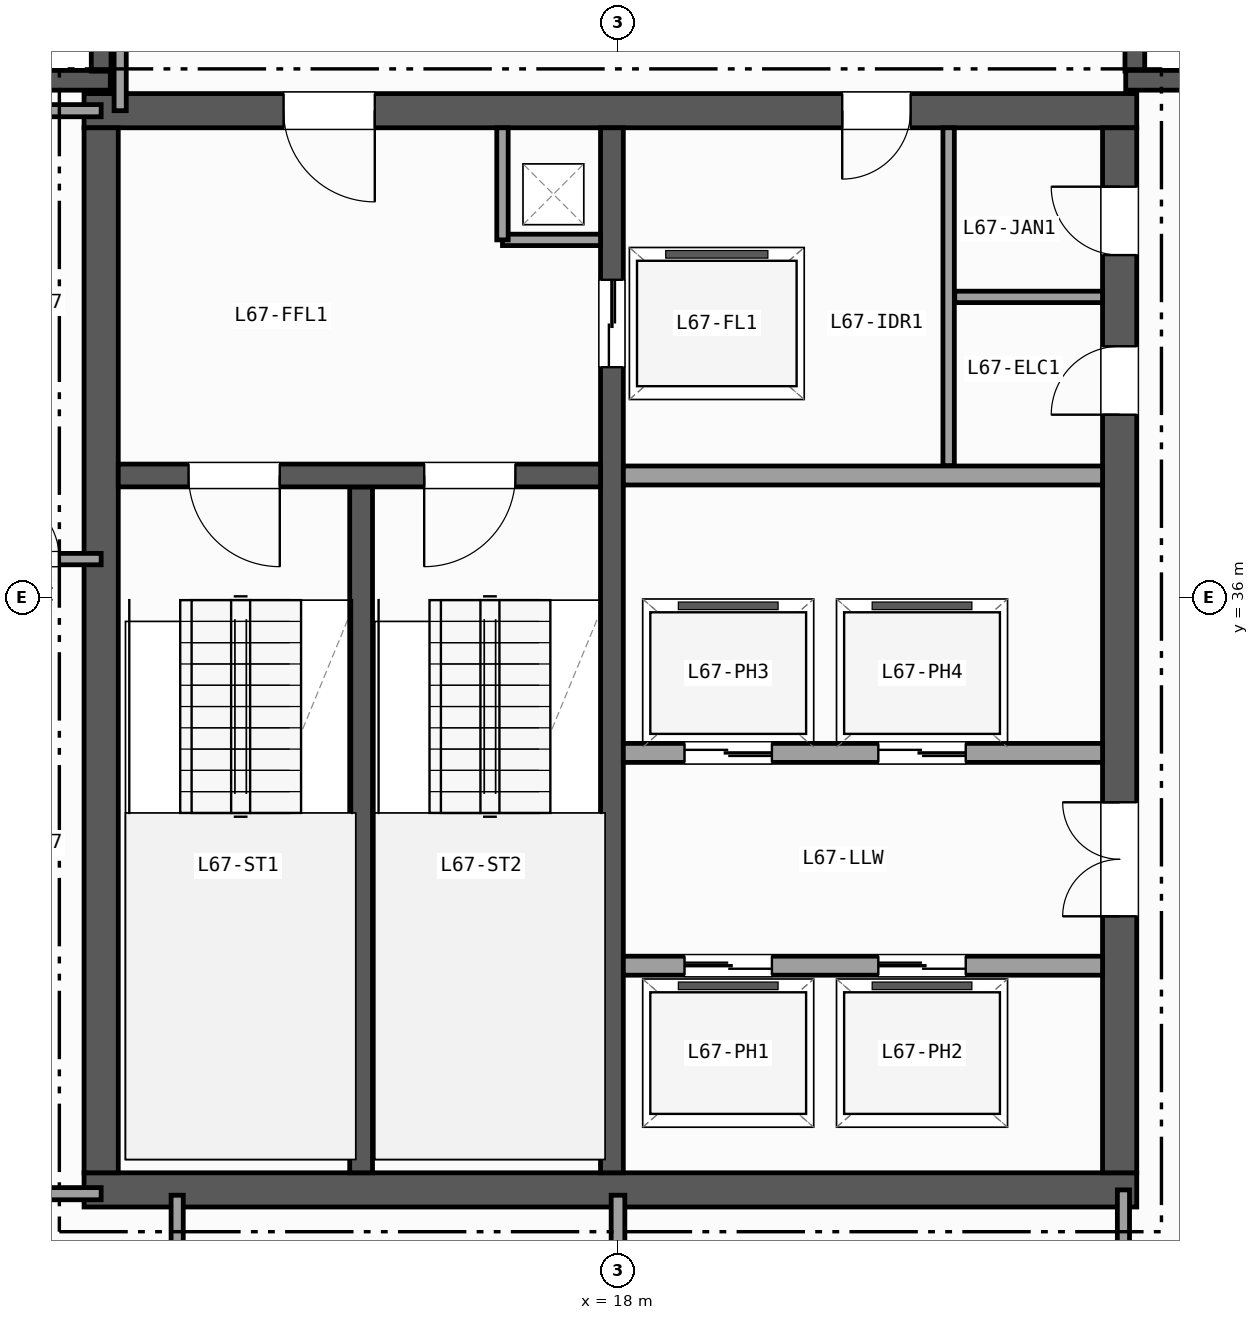
"""IFC4 building model, lengths in metres.
Left out: names, types, materials, properties, quantities, classifications, styles, units other than length and angle.
Written with IfcOpenShell. Run it as: python <this file> out.ifc"""

import sys

from ifc_helpers import new_model, si_unit, direction, frame, frame_2d, origin, place, context, subcontext, project, spatial, rectangle, extrude, element, fill, save


model = new_model("IFC4")
c1 = context("Model", 3, precision=1e-05, world=origin(), true_north=direction((0.0, 1.0)))
c2 = subcontext(c1, "Body", "Model", "MODEL_VIEW")
j1 = project(units=[si_unit("LENGTHUNIT", "METRE"), si_unit("PLANEANGLEUNIT", "RADIAN")], contexts=[c1])
p1 = place(None, origin())
s1 = spatial("IfcSite", under=j1, at=p1, CompositionType="ELEMENT")
p2 = place(p1, origin())
s2 = spatial("IfcBuilding", under=s1, at=p2, CompositionType="ELEMENT")
p3 = place(p2, frame((0.0, 0.0, 266.7)))
s3 = spatial("IfcBuildingStorey", under=s2, at=p3, CompositionType="ELEMENT", Elevation=266.7)
p4 = place(p3, frame((9.0, 42.8, 0.0), z_axis=(0.0, 0.0, 1.0), x_axis=(1.0, 0.0, 0.0)))
e1 = element("IfcWall", 1, at=p4, inside=s3, PredefinedType="SOLIDWALL", context=c2, shape_type="SweptSolid", body=[
    extrude(rectangle(XDim=2.32, YDim=0.26, at=frame_2d((1.16, 0.0))), origin(), (0.0, 0.0, 1.0), 3.42),
])
for number, where, z_axis, x_axis in (
    (2, (11.2, 42.92, 0.0), (0.0, 0.0, 1.0), (0.0, 1.0, 0.0)),
    (3, (24.8, 45.0, 0.0), (0.0, 0.0, 1.0), (0.0, -1.0, 0.0)),
):
    element("IfcWall", number, at=place(p3, frame(where, z_axis=z_axis, x_axis=x_axis)), inside=s3, PredefinedType="SOLIDWALL", context=c2, shape_type="SweptSolid", body=[
        extrude(rectangle(XDim=2.08, YDim=0.26, at=frame_2d((1.04, 0.0))), origin(), (0.0, 0.0, 1.0), 3.42),
    ])
p5 = place(p3, frame((24.68, 42.8, 0.0), z_axis=(0.0, 0.0, 1.0), x_axis=(1.0, 0.0, 0.0)))
e4 = element("IfcWall", 4, at=p5, inside=s3, PredefinedType="SOLIDWALL", context=c2, shape_type="SweptSolid", body=[
    extrude(rectangle(XDim=2.32, YDim=0.26, at=frame_2d((1.16, 0.0))), origin(), (0.0, 0.0, 1.0), 3.42),
])
p6 = place(p3, frame((10.975, 28.2, 0.0), z_axis=(0.0, 0.0, 1.0), x_axis=(1.0, 0.0, 0.0)))
e5 = element("IfcWall", 5, at=p6, inside=s3, PredefinedType="SHEAR", context=c2, shape_type="SweptSolid", body=[
    extrude(rectangle(XDim=13.85, YDim=0.45, at=frame_2d((6.925, 0.0))), origin(), (0.0, 0.0, 1.0), 3.42),
])
p7 = place(p3, frame((24.825, 42.4, 0.0), z_axis=(0.0, 0.0, 1.0), x_axis=(-1.0, 0.0, 0.0)))
e6 = element("IfcWall", 6, at=p7, inside=s3, PredefinedType="SHEAR", context=c2, shape_type="SweptSolid", body=[
    extrude(rectangle(XDim=13.85, YDim=0.45, at=frame_2d((6.925, 0.0))), origin(), (0.0, 0.0, 1.0), 3.42),
])
p8 = place(p7, frame((10.025, 0.0, 0.0)))
e7 = element("IfcOpeningElement", 7, at=p8, cuts=e6, PredefinedType="OPENING", context=c2, shape_type="SweptSolid", body=[
    extrude(rectangle(XDim=1.2, YDim=2.15, at=frame_2d((0.6, 1.075))), frame((0.0, 0.235, 0.0), z_axis=(0.0, -1.0, 0.0), x_axis=(1.0, 0.0, 0.0)), (0.0, 0.0, 1.0), 0.47),
])
p9 = place(p7, frame((2.975, 0.0, 0.0)))
e8 = element("IfcOpeningElement", 8, at=p9, cuts=e6, PredefinedType="OPENING", context=c2, shape_type="SweptSolid", body=[
    extrude(rectangle(XDim=0.9, YDim=2.1, at=frame_2d((0.45, 1.05))), frame((0.0, 0.235, 0.0), z_axis=(0.0, -1.0, 0.0), x_axis=(1.0, 0.0, 0.0)), (0.0, 0.0, 1.0), 0.47),
])
p10 = place(p3, frame((11.2, 42.175, 0.0), z_axis=(0.0, 0.0, 1.0), x_axis=(0.0, -1.0, 0.0)))
e9 = element("IfcWall", 9, at=p10, inside=s3, PredefinedType="SHEAR", context=c2, shape_type="SweptSolid", body=[
    extrude(rectangle(XDim=13.75, YDim=0.45, at=frame_2d((6.875, 0.0))), origin(), (0.0, 0.0, 1.0), 3.42),
])
p11 = place(p3, frame((24.6, 28.425, 0.0), z_axis=(0.0, 0.0, 1.0), x_axis=(0.0, 1.0, 0.0)))
e10 = element("IfcWall", 10, at=p11, inside=s3, PredefinedType="SHEAR", context=c2, shape_type="SweptSolid", body=[
    extrude(rectangle(XDim=13.75, YDim=0.45, at=frame_2d((6.875, 0.0))), origin(), (0.0, 0.0, 1.0), 3.42),
])
p12 = place(p11, frame((3.375, 0.0, 0.0)))
e11 = element("IfcOpeningElement", 11, at=p12, cuts=e10, PredefinedType="OPENING", context=c2, shape_type="SweptSolid", body=[
    extrude(rectangle(XDim=1.5, YDim=2.2, at=frame_2d((0.75, 1.1))), frame((0.0, 0.235, 0.0), z_axis=(0.0, -1.0, 0.0), x_axis=(1.0, 0.0, 0.0)), (0.0, 0.0, 1.0), 0.47),
])
p13 = place(p11, frame((9.975, 0.0, 0.0)))
e12 = element("IfcOpeningElement", 12, at=p13, cuts=e10, PredefinedType="OPENING", context=c2, shape_type="SweptSolid", body=[
    extrude(rectangle(XDim=0.9, YDim=2.1, at=frame_2d((0.45, 1.05))), frame((0.0, 0.235, 0.0), z_axis=(0.0, -1.0, 0.0), x_axis=(1.0, 0.0, 0.0)), (0.0, 0.0, 1.0), 0.47),
])
p14 = place(p11, frame((12.075, 0.0, 0.0)))
e13 = element("IfcOpeningElement", 13, at=p14, cuts=e10, PredefinedType="OPENING", context=c2, shape_type="SweptSolid", body=[
    extrude(rectangle(XDim=0.9, YDim=2.1, at=frame_2d((0.45, 1.05))), frame((0.0, 0.235, 0.0), z_axis=(0.0, -1.0, 0.0), x_axis=(1.0, 0.0, 0.0)), (0.0, 0.0, 1.0), 0.47),
])
p15 = place(p3, frame((14.62, 28.425, 0.0), z_axis=(0.0, 0.0, 1.0), x_axis=(0.0, 1.0, 0.0)))
e14 = element("IfcWall", 14, at=p15, inside=s3, PredefinedType="SHEAR", context=c2, shape_type="SweptSolid", body=[
    extrude(rectangle(XDim=9.025, YDim=0.3, at=frame_2d((4.512, 0.0))), origin(), (0.0, 0.0, 1.0), 3.42),
])
p16 = place(p3, frame((17.92, 42.175, 0.0), z_axis=(0.0, 0.0, 1.0), x_axis=(0.0, -1.0, 0.0)))
e15 = element("IfcWall", 15, at=p16, inside=s3, PredefinedType="SHEAR", context=c2, shape_type="SweptSolid", body=[
    extrude(rectangle(XDim=13.75, YDim=0.3, at=frame_2d((6.875, 0.0))), origin(), (0.0, 0.0, 1.0), 3.42),
])
p17 = place(p16, frame((2.0, 0.0, 0.0)))
e16 = element("IfcOpeningElement", 16, at=p17, cuts=e15, PredefinedType="OPENING", context=c2, shape_type="SweptSolid", body=[
    extrude(rectangle(XDim=1.15, YDim=2.15, at=frame_2d((0.575, 1.075))), frame((0.0, 0.16, 0.0), z_axis=(0.0, -1.0, 0.0), x_axis=(1.0, 0.0, 0.0)), (0.0, 0.0, 1.0), 0.32),
])
p18 = place(p3, frame((17.77, 37.6, 0.0), z_axis=(0.0, 0.0, 1.0), x_axis=(-1.0, 0.0, 0.0)))
e17 = element("IfcWall", 17, at=p18, inside=s3, PredefinedType="SHEAR", context=c2, shape_type="SweptSolid", body=[
    extrude(rectangle(XDim=6.345, YDim=0.3, at=frame_2d((3.172, 0.0))), origin(), (0.0, 0.0, 1.0), 3.42),
])
p19 = place(p18, frame((4.22, 0.0, 0.0)))
e18 = element("IfcOpeningElement", 18, at=p19, cuts=e17, PredefinedType="OPENING", context=c2, shape_type="SweptSolid", body=[
    extrude(rectangle(XDim=1.2, YDim=2.15, at=frame_2d((0.6, 1.075))), frame((0.0, 0.16, 0.0), z_axis=(0.0, -1.0, 0.0), x_axis=(1.0, 0.0, 0.0)), (0.0, 0.0, 1.0), 0.32),
])
p20 = place(p18, frame((1.12, 0.0, 0.0)))
e19 = element("IfcOpeningElement", 19, at=p20, cuts=e17, PredefinedType="OPENING", context=c2, shape_type="SweptSolid", body=[
    extrude(rectangle(XDim=1.2, YDim=2.15, at=frame_2d((0.6, 1.075))), frame((0.0, 0.16, 0.0), z_axis=(0.0, -1.0, 0.0), x_axis=(1.0, 0.0, 0.0)), (0.0, 0.0, 1.0), 0.32),
])
p21 = place(p3, frame((16.48, 40.7, 0.0), z_axis=(0.0, 0.0, 1.0), x_axis=(1.0, 0.0, 0.0)))
e20 = element("IfcWall", 20, at=p21, inside=s3, PredefinedType="PARTITIONING", context=c2, shape_type="SweptSolid", body=[
    extrude(rectangle(XDim=1.29, YDim=0.15, at=frame_2d((0.645, 0.0))), origin(), (0.0, 0.0, 1.0), 3.42),
])
p22 = place(p3, frame((16.48, 40.7, 0.0), z_axis=(0.0, 0.0, 1.0), x_axis=(0.0, 1.0, 0.0)))
e21 = element("IfcWall", 21, at=p22, inside=s3, PredefinedType="PARTITIONING", context=c2, shape_type="SweptSolid", body=[
    extrude(rectangle(XDim=1.475, YDim=0.15, at=frame_2d((0.738, 0.0))), origin(), (0.0, 0.0, 1.0), 3.42),
])
p23 = place(p3, frame((18.07, 37.6, 0.0), z_axis=(0.0, 0.0, 1.0), x_axis=(1.0, 0.0, 0.0)))
e22 = element("IfcWall", 22, at=p23, inside=s3, PredefinedType="PARTITIONING", context=c2, shape_type="SweptSolid", body=[
    extrude(rectangle(XDim=6.305, YDim=0.25, at=frame_2d((3.152, 0.0))), origin(), (0.0, 0.0, 1.0), 3.42),
])
p24 = place(p3, frame((18.07, 31.15, 0.0), z_axis=(0.0, 0.0, 1.0), x_axis=(1.0, 0.0, 0.0)))
e23 = element("IfcWall", 23, at=p24, inside=s3, PredefinedType="PARTITIONING", context=c2, shape_type="SweptSolid", body=[
    extrude(rectangle(XDim=6.305, YDim=0.25, at=frame_2d((3.152, 0.0))), origin(), (0.0, 0.0, 1.0), 3.42),
])
p25 = place(p24, frame((0.805, 0.0, 0.0)))
e24 = element("IfcOpeningElement", 24, at=p25, cuts=e23, PredefinedType="OPENING", context=c2, shape_type="SweptSolid", body=[
    extrude(rectangle(XDim=1.15, YDim=2.15, at=frame_2d((0.575, 1.075))), frame((0.0, 0.135, 0.0), z_axis=(0.0, -1.0, 0.0), x_axis=(1.0, 0.0, 0.0)), (0.0, 0.0, 1.0), 0.27),
])
p26 = place(p24, frame((3.355, 0.0, 0.0)))
e25 = element("IfcOpeningElement", 25, at=p26, cuts=e23, PredefinedType="OPENING", context=c2, shape_type="SweptSolid", body=[
    extrude(rectangle(XDim=1.15, YDim=2.15, at=frame_2d((0.575, 1.075))), frame((0.0, 0.135, 0.0), z_axis=(0.0, -1.0, 0.0), x_axis=(1.0, 0.0, 0.0)), (0.0, 0.0, 1.0), 0.27),
])
p27 = place(p3, frame((24.375, 33.95, 0.0), z_axis=(0.0, 0.0, 1.0), x_axis=(-1.0, 0.0, 0.0)))
e26 = element("IfcWall", 26, at=p27, inside=s3, PredefinedType="PARTITIONING", context=c2, shape_type="SweptSolid", body=[
    extrude(rectangle(XDim=6.305, YDim=0.25, at=frame_2d((3.152, 0.0))), origin(), (0.0, 0.0, 1.0), 3.42),
])
p28 = place(p27, frame((4.35, 0.0, 0.0)))
e27 = element("IfcOpeningElement", 27, at=p28, cuts=e26, PredefinedType="OPENING", context=c2, shape_type="SweptSolid", body=[
    extrude(rectangle(XDim=1.15, YDim=2.15, at=frame_2d((0.575, 1.075))), frame((0.0, 0.135, 0.0), z_axis=(0.0, -1.0, 0.0), x_axis=(1.0, 0.0, 0.0)), (0.0, 0.0, 1.0), 0.27),
])
p29 = place(p27, frame((1.8, 0.0, 0.0)))
e28 = element("IfcOpeningElement", 28, at=p29, cuts=e26, PredefinedType="OPENING", context=c2, shape_type="SweptSolid", body=[
    extrude(rectangle(XDim=1.15, YDim=2.15, at=frame_2d((0.575, 1.075))), frame((0.0, 0.135, 0.0), z_axis=(0.0, -1.0, 0.0), x_axis=(1.0, 0.0, 0.0)), (0.0, 0.0, 1.0), 0.27),
])
p30 = place(p3, frame((22.35, 37.73, 0.0), z_axis=(0.0, 0.0, 1.0), x_axis=(0.0, 1.0, 0.0)))
e29 = element("IfcWall", 29, at=p30, inside=s3, PredefinedType="PARTITIONING", context=c2, shape_type="SweptSolid", body=[
    extrude(rectangle(XDim=4.445, YDim=0.15, at=frame_2d((2.223, 0.0))), origin(), (0.0, 0.0, 1.0), 3.42),
])
p31 = place(p3, frame((22.43, 39.95, 0.0), z_axis=(0.0, 0.0, 1.0), x_axis=(1.0, 0.0, 0.0)))
e30 = element("IfcWall", 30, at=p31, inside=s3, PredefinedType="PARTITIONING", context=c2, shape_type="SweptSolid", body=[
    extrude(rectangle(XDim=1.945, YDim=0.15, at=frame_2d((0.973, 0.0))), origin(), (0.0, 0.0, 1.0), 3.42),
])
p32 = place(p3, frame((9.0, 28.15, 0.0), z_axis=(0.0, 0.0, 1.0), x_axis=(1.0, 0.0, 0.0)))
e31 = element("IfcWall", 31, at=p32, inside=s3, PredefinedType="PARTITIONING", context=c2, shape_type="SweptSolid", body=[
    extrude(rectangle(XDim=2.2, YDim=0.16, at=frame_2d((1.1, 0.0))), origin(), (0.0, 0.0, 1.0), 2.707),
])
p33 = place(p32, frame((0.45, 0.0, 0.0)))
e32 = element("IfcOpeningElement", 32, at=p33, cuts=e31, PredefinedType="OPENING", context=c2, shape_type="SweptSolid", body=[
    extrude(rectangle(XDim=0.95, YDim=2.1, at=frame_2d((0.475, 1.05))), frame((0.0, 0.09, 0.0), z_axis=(0.0, -1.0, 0.0), x_axis=(1.0, 0.0, 0.0)), (0.0, 0.0, 1.0), 0.18),
])
p34 = place(p3, frame((8.761, 42.4, 0.0), z_axis=(0.0, 0.0, 1.0), x_axis=(1.0, 0.0, 0.0)))
e33 = element("IfcWall", 33, at=p34, inside=s3, PredefinedType="PARTITIONING", context=c2, shape_type="SweptSolid", body=[
    extrude(rectangle(XDim=2.439, YDim=0.16, at=frame_2d((1.219, 0.0))), origin(), (0.0, 0.0, 1.0), 3.42),
])
p35 = place(p3, frame((11.45, 42.4, 0.0), z_axis=(0.0, 0.0, 1.0), x_axis=(0.0, 1.0, 0.0)))
e34 = element("IfcWall", 34, at=p35, inside=s3, PredefinedType="PARTITIONING", context=c2, shape_type="SweptSolid", body=[
    extrude(rectangle(XDim=2.666, YDim=0.16, at=frame_2d((1.333, 0.0))), origin(), (0.0, 0.0, 1.0), 3.42),
])
p36 = place(p3, frame((9.0, 36.5, 0.0), z_axis=(0.0, 0.0, 1.0), x_axis=(1.0, 0.0, 0.0)))
e35 = element("IfcWall", 35, at=p36, inside=s3, PredefinedType="PARTITIONING", context=c2, shape_type="SweptSolid", body=[
    extrude(rectangle(XDim=2.2, YDim=0.15, at=frame_2d((1.1, 0.0))), origin(), (0.0, 0.0, 1.0), 3.42),
])
p37 = place(p36, frame((0.75, 0.0, 0.0)))
e36 = element("IfcOpeningElement", 36, at=p37, cuts=e35, PredefinedType="OPENING", context=c2, shape_type="SweptSolid", body=[
    extrude(rectangle(XDim=0.9, YDim=2.1, at=frame_2d((0.45, 1.05))), frame((0.0, 0.085, 0.0), z_axis=(0.0, -1.0, 0.0), x_axis=(1.0, 0.0, 0.0)), (0.0, 0.0, 1.0), 0.17),
])
p38 = place(p3, frame((24.65, 9.0, 0.0), z_axis=(0.0, 0.0, 1.0), x_axis=(0.0, 1.0, 0.0)))
e37 = element("IfcWall", 37, at=p38, inside=s3, PredefinedType="PARTITIONING", context=c2, shape_type="SweptSolid", body=[
    extrude(rectangle(XDim=19.2, YDim=0.16, at=frame_2d((9.6, 0.0))), origin(), (0.0, 0.0, 1.0), 2.707),
])
p39 = place(p38, frame((8.6, 0.0, 0.0)))
e38 = element("IfcOpeningElement", 38, at=p39, cuts=e37, PredefinedType="OPENING", context=c2, shape_type="SweptSolid", body=[
    extrude(rectangle(XDim=1.05, YDim=2.15, at=frame_2d((0.525, 1.075))), frame((0.0, 0.09, 0.0), z_axis=(0.0, -1.0, 0.0), x_axis=(1.0, 0.0, 0.0)), (0.0, 0.0, 1.0), 0.18),
])
p40 = place(p38, frame((2.55, 0.0, 0.0)))
e39 = element("IfcOpeningElement", 39, at=p40, cuts=e37, PredefinedType="OPENING", context=c2, shape_type="SweptSolid", body=[
    extrude(rectangle(XDim=1.2, YDim=2.15, at=frame_2d((0.6, 1.075))), frame((0.0, 0.09, 0.0), z_axis=(0.0, -1.0, 0.0), x_axis=(1.0, 0.0, 0.0)), (0.0, 0.0, 1.0), 0.18),
])
p41 = place(p3, frame((18.0, 15.8, 0.0), z_axis=(0.0, 0.0, 1.0), x_axis=(0.0, 1.0, 0.0)))
e40 = element("IfcWall", 40, at=p41, inside=s3, PredefinedType="PARTITIONING", context=c2, shape_type="SweptSolid", body=[
    extrude(rectangle(XDim=12.33, YDim=0.18, at=frame_2d((6.165, 0.0))), origin(), (0.0, 0.0, 1.0), 2.789),
])
p42 = place(p41, frame((5.7, 0.0, 0.0)))
e41 = element("IfcOpeningElement", 41, at=p42, cuts=e40, PredefinedType="OPENING", context=c2, shape_type="SweptSolid", body=[
    extrude(rectangle(XDim=0.86, YDim=2.05, at=frame_2d((0.43, 1.025))), frame((0.0, 0.1, 0.0), z_axis=(0.0, -1.0, 0.0), x_axis=(1.0, 0.0, 0.0)), (0.0, 0.0, 1.0), 0.2),
])
p43 = place(p3, frame((12.2, 18.0, 0.0), z_axis=(0.0, 0.0, 1.0), x_axis=(0.0, 1.0, 0.0)))
e42 = element("IfcWall", 42, at=p43, inside=s3, PredefinedType="PARTITIONING", context=c2, shape_type="SweptSolid", body=[
    extrude(rectangle(XDim=10.13, YDim=0.16, at=frame_2d((5.065, 0.0))), origin(), (0.0, 0.0, 1.0), 2.789),
])
p44 = place(p43, frame((2.5, 0.0, 0.0)))
e43 = element("IfcOpeningElement", 43, at=p44, cuts=e42, PredefinedType="OPENING", context=c2, shape_type="SweptSolid", body=[
    extrude(rectangle(XDim=0.95, YDim=2.1, at=frame_2d((0.475, 1.05))), frame((0.0, 0.09, 0.0), z_axis=(0.0, -1.0, 0.0), x_axis=(1.0, 0.0, 0.0)), (0.0, 0.0, 1.0), 0.18),
])
p45 = place(p19, origin())
e44 = element("IfcDoor", 44, at=p45, inside=s3, OperationType="SINGLE_SWING_LEFT", PredefinedType="DOOR", context=c2, shape_type="SweptSolid", body=[
    extrude(rectangle(XDim=1.2, YDim=2.15, at=frame_2d((0.6, 1.075))), frame((0.0, 0.025, 0.0), z_axis=(0.0, -1.0, 0.0), x_axis=(1.0, 0.0, 0.0)), (0.0, 0.0, 1.0), 0.05),
])
fill(e18, e44)
p46 = place(p20, origin())
e45 = element("IfcDoor", 45, at=p46, inside=s3, OperationType="SINGLE_SWING_RIGHT", PredefinedType="DOOR", context=c2, shape_type="SweptSolid", body=[
    extrude(rectangle(XDim=1.2, YDim=2.15, at=frame_2d((0.6, 1.075))), frame((0.0, 0.025, 0.0), z_axis=(0.0, -1.0, 0.0), x_axis=(1.0, 0.0, 0.0)), (0.0, 0.0, 1.0), 0.05),
])
fill(e19, e45)
p47 = place(p12, origin())
e46 = element("IfcDoor", 46, at=p47, inside=s3, OperationType="DOUBLE_DOOR_SINGLE_SWING", PredefinedType="DOOR", context=c2, shape_type="SweptSolid", body=[
    extrude(rectangle(XDim=1.5, YDim=2.2, at=frame_2d((0.75, 1.1))), frame((0.0, 0.025, 0.0), z_axis=(0.0, -1.0, 0.0), x_axis=(1.0, 0.0, 0.0)), (0.0, 0.0, 1.0), 0.05),
])
fill(e11, e46)
p48 = place(p8, origin())
e47 = element("IfcDoor", 47, at=p48, inside=s3, OperationType="SINGLE_SWING_LEFT", PredefinedType="DOOR", context=c2, shape_type="SweptSolid", body=[
    extrude(rectangle(XDim=1.2, YDim=2.15, at=frame_2d((0.6, 1.075))), frame((0.0, 0.025, 0.0), z_axis=(0.0, -1.0, 0.0), x_axis=(1.0, 0.0, 0.0)), (0.0, 0.0, 1.0), 0.05),
])
fill(e7, e47)
p49 = place(p13, origin())
e48 = element("IfcDoor", 48, at=p49, inside=s3, OperationType="SINGLE_SWING_LEFT", PredefinedType="DOOR", context=c2, shape_type="SweptSolid", body=[
    extrude(rectangle(XDim=0.9, YDim=2.1, at=frame_2d((0.45, 1.05))), frame((0.0, 0.025, 0.0), z_axis=(0.0, -1.0, 0.0), x_axis=(1.0, 0.0, 0.0)), (0.0, 0.0, 1.0), 0.05),
])
fill(e12, e48)
p50 = place(p9, origin())
e49 = element("IfcDoor", 49, at=p50, inside=s3, OperationType="SINGLE_SWING_RIGHT", PredefinedType="DOOR", context=c2, shape_type="SweptSolid", body=[
    extrude(rectangle(XDim=0.9, YDim=2.1, at=frame_2d((0.45, 1.05))), frame((0.0, 0.025, 0.0), z_axis=(0.0, -1.0, 0.0), x_axis=(1.0, 0.0, 0.0)), (0.0, 0.0, 1.0), 0.05),
])
fill(e8, e49)
p51 = place(p14, origin())
e50 = element("IfcDoor", 50, at=p51, inside=s3, OperationType="SINGLE_SWING_RIGHT", PredefinedType="DOOR", context=c2, shape_type="SweptSolid", body=[
    extrude(rectangle(XDim=0.9, YDim=2.1, at=frame_2d((0.45, 1.05))), frame((0.0, 0.025, 0.0), z_axis=(0.0, -1.0, 0.0), x_axis=(1.0, 0.0, 0.0)), (0.0, 0.0, 1.0), 0.05),
])
fill(e13, e50)
p52 = place(p17, origin())
e51 = element("IfcDoor", 51, at=p52, inside=s3, OperationType="DOUBLE_DOOR_SLIDING", PredefinedType="DOOR", context=c2, shape_type="SweptSolid", body=[
    extrude(rectangle(XDim=1.15, YDim=2.15, at=frame_2d((0.575, 1.075))), frame((0.0, 0.025, 0.0), z_axis=(0.0, -1.0, 0.0), x_axis=(1.0, 0.0, 0.0)), (0.0, 0.0, 1.0), 0.05),
])
fill(e16, e51)
p53 = place(p25, origin())
e52 = element("IfcDoor", 52, at=p53, inside=s3, OperationType="DOUBLE_DOOR_SLIDING", PredefinedType="DOOR", context=c2, shape_type="SweptSolid", body=[
    extrude(rectangle(XDim=1.15, YDim=2.15, at=frame_2d((0.575, 1.075))), frame((0.0, 0.025, 0.0), z_axis=(0.0, -1.0, 0.0), x_axis=(1.0, 0.0, 0.0)), (0.0, 0.0, 1.0), 0.05),
])
fill(e24, e52)
p54 = place(p26, origin())
e53 = element("IfcDoor", 53, at=p54, inside=s3, OperationType="DOUBLE_DOOR_SLIDING", PredefinedType="DOOR", context=c2, shape_type="SweptSolid", body=[
    extrude(rectangle(XDim=1.15, YDim=2.15, at=frame_2d((0.575, 1.075))), frame((0.0, 0.025, 0.0), z_axis=(0.0, -1.0, 0.0), x_axis=(1.0, 0.0, 0.0)), (0.0, 0.0, 1.0), 0.05),
])
fill(e25, e53)
p55 = place(p28, origin())
e54 = element("IfcDoor", 54, at=p55, inside=s3, OperationType="DOUBLE_DOOR_SLIDING", PredefinedType="DOOR", context=c2, shape_type="SweptSolid", body=[
    extrude(rectangle(XDim=1.15, YDim=2.15, at=frame_2d((0.575, 1.075))), frame((0.0, 0.025, 0.0), z_axis=(0.0, -1.0, 0.0), x_axis=(1.0, 0.0, 0.0)), (0.0, 0.0, 1.0), 0.05),
])
fill(e27, e54)
p56 = place(p29, origin())
e55 = element("IfcDoor", 55, at=p56, inside=s3, OperationType="DOUBLE_DOOR_SLIDING", PredefinedType="DOOR", context=c2, shape_type="SweptSolid", body=[
    extrude(rectangle(XDim=1.15, YDim=2.15, at=frame_2d((0.575, 1.075))), frame((0.0, 0.025, 0.0), z_axis=(0.0, -1.0, 0.0), x_axis=(1.0, 0.0, 0.0)), (0.0, 0.0, 1.0), 0.05),
])
fill(e28, e55)
p57 = place(p37, origin())
e56 = element("IfcDoor", 56, at=p57, inside=s3, OperationType="SINGLE_SWING_LEFT", PredefinedType="DOOR", context=c2, shape_type="SweptSolid", body=[
    extrude(rectangle(XDim=0.9, YDim=2.1, at=frame_2d((0.45, 1.05))), frame((0.0, 0.025, 0.0), z_axis=(0.0, -1.0, 0.0), x_axis=(1.0, 0.0, 0.0)), (0.0, 0.0, 1.0), 0.05),
])
fill(e36, e56)
save(model, sys.argv[1])
